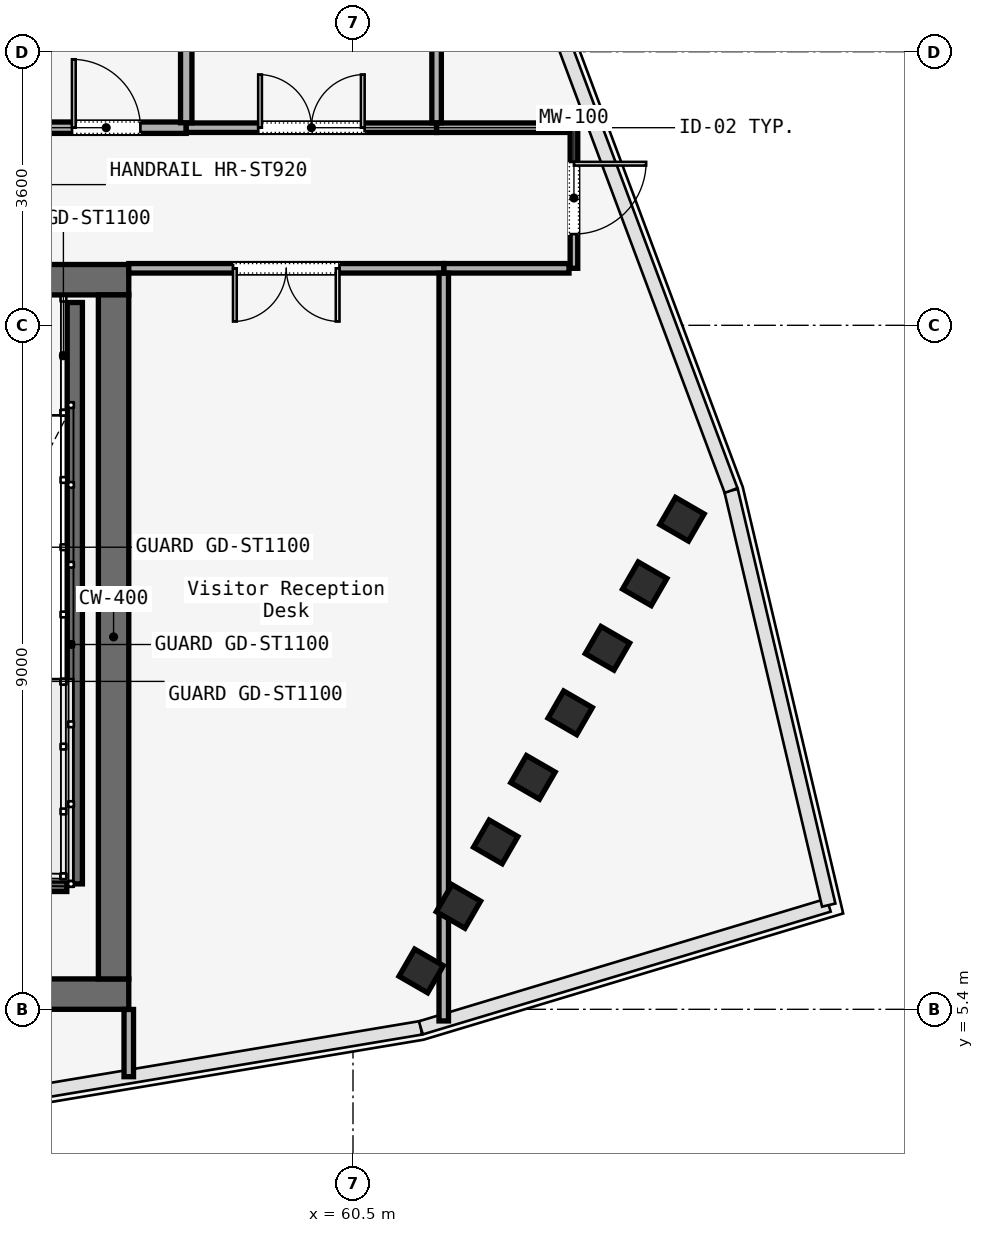
"""IFC4 building model, lengths in metres.
Left out: names, types, materials, properties, quantities, classifications, styles, units other than length and angle.
Written with IfcOpenShell. Run it as: python <this file> out.ifc"""

import sys

from ifc_helpers import new_model, si_unit, direction, frame, frame_2d, origin, origin_2d, place, context, subcontext, project, spatial, rectangle, i_section, extrude, element, fill, save


model = new_model("IFC4")
c1 = context("Model", 3, precision=1e-05, world=origin(), true_north=direction((0.0, 1.0)))
c2 = subcontext(c1, "Body", "Model", "MODEL_VIEW")
j1 = project(units=[si_unit("LENGTHUNIT", "METRE"), si_unit("PLANEANGLEUNIT", "RADIAN")], contexts=[c1])
p1 = place(None, origin())
s1 = spatial("IfcSite", under=j1, at=p1, CompositionType="ELEMENT")
p2 = place(p1, origin())
s2 = spatial("IfcBuilding", under=s1, at=p2, CompositionType="ELEMENT")
p3 = place(p2, frame((0.0, 0.0, 208.4)))
s3 = spatial("IfcBuildingStorey", under=s2, at=p3, CompositionType="ELEMENT", Elevation=208.4)
p4 = place(p3, frame((26.45, 15.0, 0.0), z_axis=(0.0, 0.0, 1.0), x_axis=(1.0, 0.0, 0.0)))
e1 = element("IfcWall", 1, at=p4, inside=s3, PredefinedType="SOLIDWALL", context=c2, shape_type="SweptSolid", body=[
    extrude(rectangle(XDim=31.1, YDim=0.4, at=frame_2d((15.55, 0.0))), origin(), (0.0, 0.0, 1.0), 4.52),
])
p5 = place(p4, frame((1.65, 0.0, 0.0)))
e2 = element("IfcOpeningElement", 2, at=p5, cuts=e1, PredefinedType="OPENING", context=c2, shape_type="SweptSolid", body=[
    extrude(rectangle(XDim=1.1, YDim=2.2, at=frame_2d((0.55, 1.1))), frame((0.0, 0.2, 0.0), z_axis=(0.0, -1.0, 0.0), x_axis=(1.0, 0.0, 0.0)), (0.0, 0.0, 1.0), 0.4),
])
p6 = place(p4, frame((13.65, 0.0, 0.0)))
e3 = element("IfcOpeningElement", 3, at=p6, cuts=e1, PredefinedType="OPENING", context=c2, shape_type="SweptSolid", body=[
    extrude(rectangle(XDim=1.1, YDim=2.2, at=frame_2d((0.55, 1.1))), frame((0.0, 0.2, 0.0), z_axis=(0.0, -1.0, 0.0), x_axis=(1.0, 0.0, 0.0)), (0.0, 0.0, 1.0), 0.4),
])
p7 = place(p4, frame((25.55, 0.0, 0.0)))
e4 = element("IfcOpeningElement", 4, at=p7, cuts=e1, PredefinedType="OPENING", context=c2, shape_type="SweptSolid", body=[
    extrude(rectangle(XDim=1.1, YDim=2.2, at=frame_2d((0.55, 1.1))), frame((0.0, 0.2, 0.0), z_axis=(0.0, -1.0, 0.0), x_axis=(1.0, 0.0, 0.0)), (0.0, 0.0, 1.0), 0.4),
])
p8 = place(p4, frame((10.7, 0.0, 0.0)))
e5 = element("IfcOpeningElement", 5, at=p8, cuts=e1, PredefinedType="OPENING", context=c2, shape_type="SweptSolid", body=[
    extrude(rectangle(XDim=1.4, YDim=2.2, at=frame_2d((0.7, 1.1))), frame((0.0, 0.2, 0.0), z_axis=(0.0, -1.0, 0.0), x_axis=(1.0, 0.0, 0.0)), (0.0, 0.0, 1.0), 0.4),
])
p9 = place(p4, frame((19.35, 0.0, 0.0)))
e6 = element("IfcOpeningElement", 6, at=p9, cuts=e1, PredefinedType="OPENING", context=c2, shape_type="SweptSolid", body=[
    extrude(rectangle(XDim=1.1, YDim=2.2, at=frame_2d((0.55, 1.1))), frame((0.0, 0.2, 0.0), z_axis=(0.0, -1.0, 0.0), x_axis=(1.0, 0.0, 0.0)), (0.0, 0.0, 1.0), 0.4),
])
p10 = place(p4, frame((21.4, 0.0, 0.0)))
e7 = element("IfcOpeningElement", 7, at=p10, cuts=e1, PredefinedType="OPENING", context=c2, shape_type="SweptSolid", body=[
    extrude(rectangle(XDim=0.9, YDim=2.1, at=frame_2d((0.45, 1.05))), frame((0.0, 0.2, 0.0), z_axis=(0.0, -1.0, 0.0), x_axis=(1.0, 0.0, 0.0)), (0.0, 0.0, 1.0), 0.4),
])
p11 = place(p4, frame((23.35, 0.0, 0.0)))
e8 = element("IfcOpeningElement", 8, at=p11, cuts=e1, PredefinedType="OPENING", context=c2, shape_type="SweptSolid", body=[
    extrude(rectangle(XDim=1.3, YDim=2.3, at=frame_2d((0.65, 1.15))), frame((0.0, 0.2, 0.0), z_axis=(0.0, -1.0, 0.0), x_axis=(1.0, 0.0, 0.0)), (0.0, 0.0, 1.0), 0.4),
])
p12 = place(p3, frame((26.45, 5.6, 0.0), z_axis=(0.0, 0.0, 1.0), x_axis=(1.0, 0.0, 0.0)))
e9 = element("IfcWall", 9, at=p12, inside=s3, PredefinedType="SOLIDWALL", context=c2, shape_type="SweptSolid", body=[
    extrude(rectangle(XDim=31.1, YDim=0.4, at=frame_2d((15.55, 0.0))), origin(), (0.0, 0.0, 1.0), 4.52),
])
p13 = place(p3, frame((57.35, 5.8, 0.0), z_axis=(0.0, 0.0, 1.0), x_axis=(0.0, 1.0, 0.0)))
e10 = element("IfcWall", 10, at=p13, inside=s3, PredefinedType="SOLIDWALL", context=c2, shape_type="SweptSolid", body=[
    extrude(rectangle(XDim=9.0, YDim=0.4, at=frame_2d((4.5, 0.0))), origin(), (0.0, 0.0, 1.0), 4.52),
])
for number, where, z_axis, x_axis in (
    (11, (61.397, 5.905, 0.0), (0.0, 0.0, 1.0), (0.5, 0.866, 0.0)),
    (12, (61.887, 6.754, 0.0), (0.0, 0.0, 1.0), (0.5, 0.866, 0.0)),
    (13, (62.377, 7.603, 0.0), (0.0, 0.0, 1.0), (0.5, 0.866, 0.0)),
    (14, (62.868, 8.452, 0.0), (0.0, 0.0, 1.0), (0.5, 0.866, 0.0)),
    (15, (63.358, 9.301, 0.0), (0.0, 0.0, 1.0), (0.5, 0.866, 0.0)),
    (16, (63.848, 10.15, 0.0), (0.0, 0.0, 1.0), (0.5, 0.866, 0.0)),
    (17, (64.338, 10.999, 0.0), (0.0, 0.0, 1.0), (0.5, 0.866, 0.0)),
    (18, (64.829, 11.848, 0.0), (0.0, 0.0, 1.0), (0.5, 0.866, 0.0)),
):
    element("IfcColumn", number, at=place(p3, frame(where, z_axis=z_axis, x_axis=x_axis)), inside=s3, PredefinedType="COLUMN", context=c2, shape_type="SweptSolid", body=[
        extrude(i_section(OverallWidth=0.412, OverallDepth=0.435, WebThickness=0.036, FlangeThickness=0.044, FilletRadius=0.015, at=origin_2d()), origin(), (0.0, 0.0, 1.0), 4.52),
    ])
p14 = place(p3, frame((56.84, 14.7, 0.0), z_axis=(0.0, 0.0, 1.0), x_axis=(0.0, -1.0, 0.0)))
e19 = element("IfcWall", 19, at=p14, inside=s3, PredefinedType="SOLIDWALL", context=c2, shape_type="SweptSolid", body=[
    extrude(rectangle(XDim=7.65, YDim=0.2, at=frame_2d((3.825, 0.0))), origin(), (0.0, 0.0, 1.0), 4.8),
])
p15 = place(p3, frame((53.62, 7.05, 0.0), z_axis=(0.0, 0.0, 1.0), x_axis=(1.0, 0.0, 0.0)))
e20 = element("IfcWall", 20, at=p15, inside=s3, PredefinedType="SOLIDWALL", context=c2, shape_type="SweptSolid", body=[
    extrude(rectangle(XDim=3.115, YDim=0.2, at=frame_2d((1.558, 0.0))), origin(), (0.0, 0.0, 1.0), 4.8),
])
p16 = place(p3, frame((63.407, 17.0, 0.0), z_axis=(0.0, 0.0, 1.0), x_axis=(0.0, -1.0, 0.0)))
e21 = element("IfcWall", 21, at=p16, inside=s3, PredefinedType="MOVABLE", context=c2, shape_type="SweptSolid", body=[
    extrude(rectangle(XDim=1.85, YDim=0.1, at=frame_2d((0.925, 0.0))), origin(), (0.0, 0.0, 1.0), 3.39),
])
p17 = place(p16, frame((0.45, 0.0, 0.0)))
e22 = element("IfcOpeningElement", 22, at=p17, cuts=e21, PredefinedType="OPENING", context=c2, shape_type="SweptSolid", body=[
    extrude(rectangle(XDim=0.95, YDim=2.2, at=frame_2d((0.475, 1.1))), frame((0.0, 0.05, 0.0), z_axis=(0.0, -1.0, 0.0), x_axis=(1.0, 0.0, 0.0)), (0.0, 0.0, 1.0), 0.1),
])
p18 = place(p3, frame((63.342, 15.15, 0.0), z_axis=(0.0, 0.0, 1.0), x_axis=(-1.0, 0.0, 0.0)))
e23 = element("IfcWall", 23, at=p18, inside=s3, PredefinedType="PARTITIONING", context=c2, shape_type="SweptSolid", body=[
    extrude(rectangle(XDim=1.648, YDim=0.125, at=frame_2d((0.824, 0.0))), origin(), (0.0, 0.0, 1.0), 3.39),
])
p19 = place(p3, frame((61.694, 15.15, 0.0), z_axis=(0.0, 0.0, 1.0), x_axis=(-1.0, 0.0, 0.0)))
e24 = element("IfcWall", 24, at=p19, inside=s3, PredefinedType="PARTITIONING", context=c2, shape_type="SweptSolid", body=[
    extrude(rectangle(XDim=4.144, YDim=0.125, at=frame_2d((2.072, 0.0))), origin(), (0.0, 0.0, 1.0), 3.39),
])
p20 = place(p19, frame((1.372, 0.0, 0.0)))
e25 = element("IfcOpeningElement", 25, at=p20, cuts=e24, PredefinedType="OPENING", context=c2, shape_type="SweptSolid", body=[
    extrude(rectangle(XDim=1.4, YDim=2.2, at=frame_2d((0.7, 1.1))), frame((0.0, 0.062, 0.0), z_axis=(0.0, -1.0, 0.0), x_axis=(1.0, 0.0, 0.0)), (0.0, 0.0, 1.0), 0.125),
])
p21 = place(p3, frame((56.2, 17.0, 0.0), z_axis=(0.0, 0.0, 1.0), x_axis=(1.0, 0.0, 0.0)))
e26 = element("IfcWall", 26, at=p21, inside=s3, PredefinedType="PARTITIONING", context=c2, shape_type="SweptSolid", body=[
    extrude(rectangle(XDim=2.106, YDim=0.15, at=frame_2d((1.053, 0.0))), origin(), (0.0, 0.0, 1.0), 3.39),
])
p22 = place(p21, frame((0.603, 0.0, 0.0)))
e27 = element("IfcOpeningElement", 27, at=p22, cuts=e26, PredefinedType="OPENING", context=c2, shape_type="SweptSolid", body=[
    extrude(rectangle(XDim=0.9, YDim=2.15, at=frame_2d((0.45, 1.075))), frame((0.0, 0.075, 0.0), z_axis=(0.0, -1.0, 0.0), x_axis=(1.0, 0.0, 0.0)), (0.0, 0.0, 1.0), 0.15),
])
p23 = place(p3, frame((58.306, 17.0, 0.0), z_axis=(0.0, 0.0, 1.0), x_axis=(1.0, 0.0, 0.0)))
e28 = element("IfcWall", 28, at=p23, inside=s3, PredefinedType="PARTITIONING", context=c2, shape_type="SweptSolid", body=[
    extrude(rectangle(XDim=3.294, YDim=0.125, at=frame_2d((1.647, 0.0))), origin(), (0.0, 0.0, 1.0), 3.39),
])
p24 = place(p23, frame((0.947, 0.0, 0.0)))
e29 = element("IfcOpeningElement", 29, at=p24, cuts=e28, PredefinedType="OPENING", context=c2, shape_type="SweptSolid", body=[
    extrude(rectangle(XDim=1.4, YDim=2.2, at=frame_2d((0.7, 1.1))), frame((0.0, 0.062, 0.0), z_axis=(0.0, -1.0, 0.0), x_axis=(1.0, 0.0, 0.0)), (0.0, 0.0, 1.0), 0.125),
])
p25 = place(p3, frame((61.6, 17.0, 0.0), z_axis=(0.0, 0.0, 1.0), x_axis=(1.0, 0.0, 0.0)))
e30 = element("IfcWall", 30, at=p25, inside=s3, PredefinedType="PARTITIONING", context=c2, shape_type="SweptSolid", body=[
    extrude(rectangle(XDim=1.742, YDim=0.125, at=frame_2d((0.871, 0.0))), origin(), (0.0, 0.0, 1.0), 3.39),
])
p26 = place(p3, frame((57.55, 4.513, 0.0), z_axis=(0.0, 0.0, 1.0), x_axis=(0.0, 1.0, 0.0)))
e31 = element("IfcWall", 31, at=p26, inside=s3, PredefinedType="PARTITIONING", context=c2, shape_type="SweptSolid", body=[
    extrude(rectangle(XDim=0.885, YDim=0.125, at=frame_2d((0.442, 0.0))), origin(), (0.0, 0.0, 1.0), 3.39),
])
p27 = place(p3, frame((61.694, 15.085, 0.0), z_axis=(0.0, 0.0, 1.0), x_axis=(0.0, -1.0, 0.0)))
e32 = element("IfcWall", 32, at=p27, inside=s3, PredefinedType="PARTITIONING", context=c2, shape_type="SweptSolid", body=[
    extrude(rectangle(XDim=9.838, YDim=0.125, at=frame_2d((4.919, 0.0))), origin(), (0.0, 0.0, 1.0), 3.39),
])
p28 = place(p3, frame((61.6, 22.587, 0.0), z_axis=(0.0, 0.0, 1.0), x_axis=(0.0, -1.0, 0.0)))
e33 = element("IfcWall", 33, at=p28, inside=s3, PredefinedType="PARTITIONING", context=c2, shape_type="SweptSolid", body=[
    extrude(rectangle(XDim=5.522, YDim=0.125, at=frame_2d((2.761, 0.0))), origin(), (0.0, 0.0, 1.0), 3.39),
])
p29 = place(p3, frame((58.306, 17.065, 0.0), z_axis=(0.0, 0.0, 1.0), x_axis=(0.0, 1.0, 0.0)))
e34 = element("IfcWall", 34, at=p29, inside=s3, PredefinedType="PARTITIONING", context=c2, shape_type="SweptSolid", body=[
    extrude(rectangle(XDim=9.135, YDim=0.15, at=frame_2d((4.567, 0.0))), origin(), (0.0, 0.0, 1.0), 3.39),
])
p30 = place(p20, origin())
e35 = element("IfcDoor", 35, at=p30, inside=s3, OperationType="SINGLE_SWING_RIGHT", PredefinedType="DOOR", context=c2, shape_type="SweptSolid", body=[
    extrude(rectangle(XDim=1.4, YDim=2.2, at=frame_2d((0.7, 1.1))), frame((0.0, 0.025, 0.0), z_axis=(0.0, -1.0, 0.0), x_axis=(1.0, 0.0, 0.0)), (0.0, 0.0, 1.0), 0.05),
])
fill(e25, e35)
p31 = place(p17, origin())
e36 = element("IfcDoor", 36, at=p31, inside=s3, OperationType="SINGLE_SWING_LEFT", PredefinedType="DOOR", context=c2, shape_type="SweptSolid", body=[
    extrude(rectangle(XDim=0.95, YDim=2.2, at=frame_2d((0.475, 1.1))), frame((0.0, 0.025, 0.0), z_axis=(0.0, -1.0, 0.0), x_axis=(1.0, 0.0, 0.0)), (0.0, 0.0, 1.0), 0.05),
])
fill(e22, e36)
p32 = place(p24, origin())
e37 = element("IfcDoor", 37, at=p32, inside=s3, OperationType="SINGLE_SWING_RIGHT", PredefinedType="DOOR", context=c2, shape_type="SweptSolid", body=[
    extrude(rectangle(XDim=1.4, YDim=2.2, at=frame_2d((0.7, 1.1))), frame((0.0, 0.025, 0.0), z_axis=(0.0, -1.0, 0.0), x_axis=(1.0, 0.0, 0.0)), (0.0, 0.0, 1.0), 0.05),
])
fill(e29, e37)
p33 = place(p22, origin())
e38 = element("IfcDoor", 38, at=p33, inside=s3, OperationType="SINGLE_SWING_LEFT", PredefinedType="DOOR", context=c2, shape_type="SweptSolid", body=[
    extrude(rectangle(XDim=0.9, YDim=2.15, at=frame_2d((0.45, 1.075))), frame((0.0, 0.025, 0.0), z_axis=(0.0, -1.0, 0.0), x_axis=(1.0, 0.0, 0.0)), (0.0, 0.0, 1.0), 0.05),
])
fill(e27, e38)
save(model, sys.argv[1])
